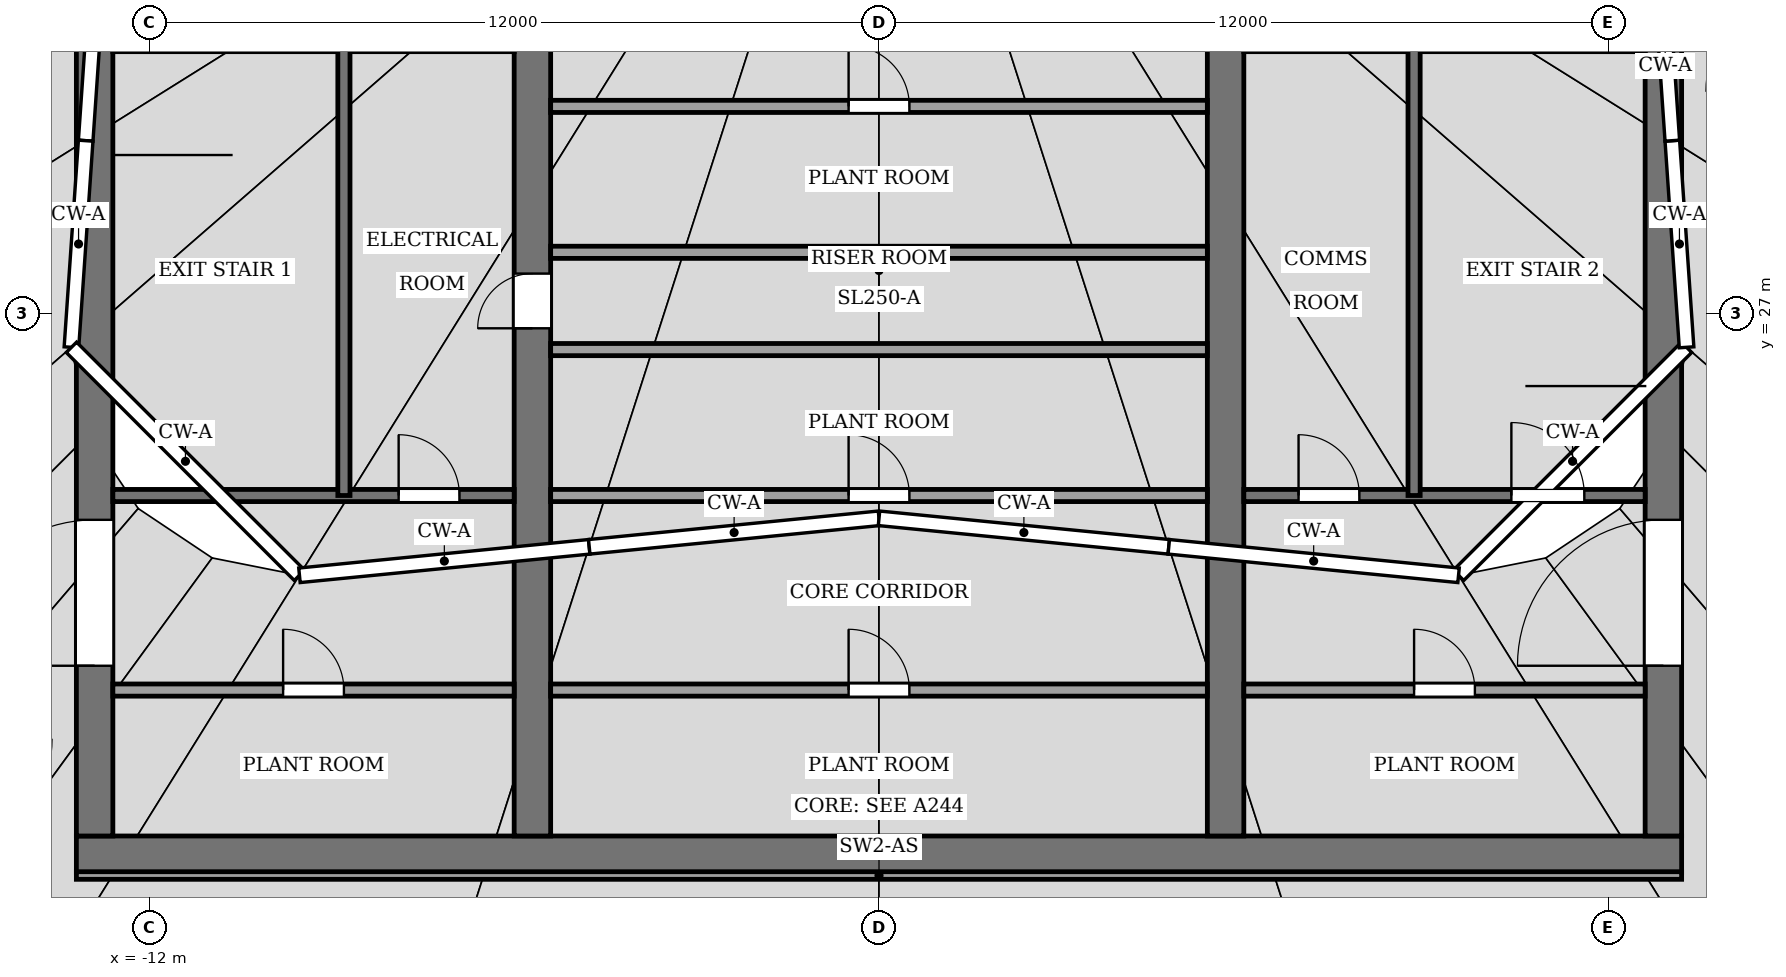
"""IFC4 building model, lengths in metres.
Left out: names, types, materials, properties, quantities, classifications, styles, units other than length and angle.
Written with IfcOpenShell. Run it as: python <this file> out.ifc"""

import sys

from ifc_helpers import new_model, si_unit, direction, frame, frame_2d, origin, place, context, subcontext, project, spatial, rectangle, extrude, element, fill, save


model = new_model("IFC4")
c1 = context("Model", 3, precision=1e-05, world=origin(), true_north=direction((0.0, 1.0)))
c2 = subcontext(c1, "Body", "Model", "MODEL_VIEW")
j1 = project(units=[si_unit("LENGTHUNIT", "METRE"), si_unit("PLANEANGLEUNIT", "RADIAN")], contexts=[c1])
p1 = place(None, origin())
s1 = spatial("IfcSite", under=j1, at=p1, CompositionType="ELEMENT")
p2 = place(p1, origin())
s2 = spatial("IfcBuilding", under=s1, at=p2, CompositionType="ELEMENT")
p3 = place(p2, frame((0.0, 0.0, 368.0)))
s3 = spatial("IfcBuildingStorey", under=s2, at=p3, CompositionType="ELEMENT", Elevation=368.0)
p4 = place(p3, frame((-13.2, 18.1, -0.15), z_axis=(0.0, 0.0, 1.0), x_axis=(1.0, 0.0, 0.0)))
e1 = element("IfcWall", 1, at=p4, inside=s3, PredefinedType="SHEAR", context=c2, shape_type="SweptSolid", body=[
    extrude(rectangle(XDim=26.4, YDim=0.6, at=frame_2d((13.2, 0.0))), origin(), (0.0, 0.0, 1.0), 3.45),
])
p5 = place(p3, frame((-12.9, 18.4, -0.15), z_axis=(0.0, 0.0, 1.0), x_axis=(0.0, 1.0, 0.0)))
e2 = element("IfcWall", 2, at=p5, inside=s3, PredefinedType="SHEAR", context=c2, shape_type="SweptSolid", body=[
    extrude(rectangle(XDim=19.2, YDim=0.6, at=frame_2d((9.6, 0.0))), origin(), (0.0, 0.0, 1.0), 3.45),
])
p6 = place(p5, frame((2.8, 0.0, 0.15)))
e3 = element("IfcOpeningElement", 3, at=p6, cuts=e2, PredefinedType="OPENING", context=c2, shape_type="SweptSolid", body=[
    extrude(rectangle(XDim=2.4, YDim=2.4, at=frame_2d((1.2, 1.2))), frame((0.0, 0.31, 0.0), z_axis=(0.0, -1.0, 0.0), x_axis=(1.0, 0.0, 0.0)), (0.0, 0.0, 1.0), 0.62),
])
p7 = place(p5, frame((13.4, 0.0, 0.15)))
e4 = element("IfcOpeningElement", 4, at=p7, cuts=e2, PredefinedType="OPENING", context=c2, shape_type="SweptSolid", body=[
    extrude(rectangle(XDim=1.4, YDim=2.2, at=frame_2d((0.7, 1.1))), frame((0.0, 0.31, 0.0), z_axis=(0.0, -1.0, 0.0), x_axis=(1.0, 0.0, 0.0)), (0.0, 0.0, 1.0), 0.62),
])
p8 = place(p3, frame((12.9, 18.4, -0.15), z_axis=(0.0, 0.0, 1.0), x_axis=(0.0, 1.0, 0.0)))
e5 = element("IfcWall", 5, at=p8, inside=s3, PredefinedType="SHEAR", context=c2, shape_type="SweptSolid", body=[
    extrude(rectangle(XDim=19.2, YDim=0.6, at=frame_2d((9.6, 0.0))), origin(), (0.0, 0.0, 1.0), 3.45),
])
p9 = place(p8, frame((2.8, 0.0, 0.15)))
e6 = element("IfcOpeningElement", 6, at=p9, cuts=e5, PredefinedType="OPENING", context=c2, shape_type="SweptSolid", body=[
    extrude(rectangle(XDim=2.4, YDim=2.4, at=frame_2d((1.2, 1.2))), frame((0.0, 0.31, 0.0), z_axis=(0.0, -1.0, 0.0), x_axis=(1.0, 0.0, 0.0)), (0.0, 0.0, 1.0), 0.62),
])
p10 = place(p8, frame((13.3, 0.0, 0.15)))
e7 = element("IfcOpeningElement", 7, at=p10, cuts=e5, PredefinedType="OPENING", context=c2, shape_type="SweptSolid", body=[
    extrude(rectangle(XDim=2.4, YDim=2.4, at=frame_2d((1.2, 1.2))), frame((0.0, 0.31, 0.0), z_axis=(0.0, -1.0, 0.0), x_axis=(1.0, 0.0, 0.0)), (0.0, 0.0, 1.0), 0.62),
])
p11 = place(p3, frame((-5.7, 18.4, -0.15), z_axis=(0.0, 0.0, 1.0), x_axis=(0.0, 1.0, 0.0)))
e8 = element("IfcWall", 8, at=p11, inside=s3, PredefinedType="SHEAR", context=c2, shape_type="SweptSolid", body=[
    extrude(rectangle(XDim=19.2, YDim=0.6, at=frame_2d((9.6, 0.0))), origin(), (0.0, 0.0, 1.0), 3.45),
])
p12 = place(p11, frame((8.35, 0.0, 0.15)))
e9 = element("IfcOpeningElement", 9, at=p12, cuts=e8, PredefinedType="OPENING", context=c2, shape_type="SweptSolid", body=[
    extrude(rectangle(XDim=0.9, YDim=2.1, at=frame_2d((0.45, 1.05))), frame((0.0, 0.31, 0.0), z_axis=(0.0, -1.0, 0.0), x_axis=(1.0, 0.0, 0.0)), (0.0, 0.0, 1.0), 0.62),
])
p13 = place(p3, frame((5.7, 18.4, -0.15), z_axis=(0.0, 0.0, 1.0), x_axis=(0.0, 1.0, 0.0)))
e10 = element("IfcWall", 10, at=p13, inside=s3, PredefinedType="SHEAR", context=c2, shape_type="SweptSolid", body=[
    extrude(rectangle(XDim=19.2, YDim=0.6, at=frame_2d((9.6, 0.0))), origin(), (0.0, 0.0, 1.0), 3.45),
])
p14 = place(p13, frame((13.3, 0.0, 0.15)))
e11 = element("IfcOpeningElement", 11, at=p14, cuts=e10, PredefinedType="OPENING", context=c2, shape_type="SweptSolid", body=[
    extrude(rectangle(XDim=2.4, YDim=2.4, at=frame_2d((1.2, 1.2))), frame((0.0, 0.31, 0.0), z_axis=(0.0, -1.0, 0.0), x_axis=(1.0, 0.0, 0.0)), (0.0, 0.0, 1.0), 0.62),
])
p15 = place(p3, frame((-12.6, 20.8, 0.0), z_axis=(0.0, 0.0, 1.0), x_axis=(1.0, 0.0, 0.0)))
e12 = element("IfcWall", 12, at=p15, inside=s3, PredefinedType="PARTITIONING", context=c2, shape_type="SweptSolid", body=[
    extrude(rectangle(XDim=6.6, YDim=0.2, at=frame_2d((3.3, 0.0))), origin(), (0.0, 0.0, 1.0), 3.3),
])
p16 = place(p15, frame((2.8, 0.0, 0.0)))
e13 = element("IfcOpeningElement", 13, at=p16, cuts=e12, PredefinedType="OPENING", context=c2, shape_type="SweptSolid", body=[
    extrude(rectangle(XDim=1.0, YDim=2.1, at=frame_2d((0.5, 1.05))), frame((0.0, 0.11, 0.0), z_axis=(0.0, -1.0, 0.0), x_axis=(1.0, 0.0, 0.0)), (0.0, 0.0, 1.0), 0.22),
])
p17 = place(p3, frame((-5.4, 20.8, 0.0), z_axis=(0.0, 0.0, 1.0), x_axis=(1.0, 0.0, 0.0)))
e14 = element("IfcWall", 14, at=p17, inside=s3, PredefinedType="PARTITIONING", context=c2, shape_type="SweptSolid", body=[
    extrude(rectangle(XDim=10.8, YDim=0.2, at=frame_2d((5.4, 0.0))), origin(), (0.0, 0.0, 1.0), 3.3),
])
p18 = place(p17, frame((4.9, 0.0, 0.0)))
e15 = element("IfcOpeningElement", 15, at=p18, cuts=e14, PredefinedType="OPENING", context=c2, shape_type="SweptSolid", body=[
    extrude(rectangle(XDim=1.0, YDim=2.1, at=frame_2d((0.5, 1.05))), frame((0.0, 0.11, 0.0), z_axis=(0.0, -1.0, 0.0), x_axis=(1.0, 0.0, 0.0)), (0.0, 0.0, 1.0), 0.22),
])
p19 = place(p3, frame((6.0, 20.8, 0.0), z_axis=(0.0, 0.0, 1.0), x_axis=(1.0, 0.0, 0.0)))
e16 = element("IfcWall", 16, at=p19, inside=s3, PredefinedType="PARTITIONING", context=c2, shape_type="SweptSolid", body=[
    extrude(rectangle(XDim=6.6, YDim=0.2, at=frame_2d((3.3, 0.0))), origin(), (0.0, 0.0, 1.0), 3.3),
])
p20 = place(p19, frame((2.8, 0.0, 0.0)))
e17 = element("IfcOpeningElement", 17, at=p20, cuts=e16, PredefinedType="OPENING", context=c2, shape_type="SweptSolid", body=[
    extrude(rectangle(XDim=1.0, YDim=2.1, at=frame_2d((0.5, 1.05))), frame((0.0, 0.11, 0.0), z_axis=(0.0, -1.0, 0.0), x_axis=(1.0, 0.0, 0.0)), (0.0, 0.0, 1.0), 0.22),
])
p21 = place(p3, frame((-12.6, 24.0, 0.0), z_axis=(0.0, 0.0, 1.0), x_axis=(1.0, 0.0, 0.0)))
e18 = element("IfcWall", 18, at=p21, inside=s3, PredefinedType="PARTITIONING", context=c2, shape_type="SweptSolid", body=[
    extrude(rectangle(XDim=6.6, YDim=0.2, at=frame_2d((3.3, 0.0))), origin(), (0.0, 0.0, 1.0), 3.3),
])
p22 = place(p21, frame((4.7, 0.0, 0.0)))
e19 = element("IfcOpeningElement", 19, at=p22, cuts=e18, PredefinedType="OPENING", context=c2, shape_type="SweptSolid", body=[
    extrude(rectangle(XDim=1.0, YDim=2.1, at=frame_2d((0.5, 1.05))), frame((0.0, 0.11, 0.0), z_axis=(0.0, -1.0, 0.0), x_axis=(1.0, 0.0, 0.0)), (0.0, 0.0, 1.0), 0.22),
])
p23 = place(p3, frame((-5.4, 24.0, 0.0), z_axis=(0.0, 0.0, 1.0), x_axis=(1.0, 0.0, 0.0)))
e20 = element("IfcWall", 20, at=p23, inside=s3, PredefinedType="PARTITIONING", context=c2, shape_type="SweptSolid", body=[
    extrude(rectangle(XDim=10.8, YDim=0.2, at=frame_2d((5.4, 0.0))), origin(), (0.0, 0.0, 1.0), 3.3),
])
p24 = place(p23, frame((4.9, 0.0, 0.0)))
e21 = element("IfcOpeningElement", 21, at=p24, cuts=e20, PredefinedType="OPENING", context=c2, shape_type="SweptSolid", body=[
    extrude(rectangle(XDim=1.0, YDim=2.1, at=frame_2d((0.5, 1.05))), frame((0.0, 0.11, 0.0), z_axis=(0.0, -1.0, 0.0), x_axis=(1.0, 0.0, 0.0)), (0.0, 0.0, 1.0), 0.22),
])
p25 = place(p3, frame((6.0, 24.0, 0.0), z_axis=(0.0, 0.0, 1.0), x_axis=(1.0, 0.0, 0.0)))
e22 = element("IfcWall", 22, at=p25, inside=s3, PredefinedType="PARTITIONING", context=c2, shape_type="SweptSolid", body=[
    extrude(rectangle(XDim=6.6, YDim=0.2, at=frame_2d((3.3, 0.0))), origin(), (0.0, 0.0, 1.0), 3.3),
])
p26 = place(p25, frame((0.9, 0.0, 0.0)))
e23 = element("IfcOpeningElement", 23, at=p26, cuts=e22, PredefinedType="OPENING", context=c2, shape_type="SweptSolid", body=[
    extrude(rectangle(XDim=1.0, YDim=2.1, at=frame_2d((0.5, 1.05))), frame((0.0, 0.11, 0.0), z_axis=(0.0, -1.0, 0.0), x_axis=(1.0, 0.0, 0.0)), (0.0, 0.0, 1.0), 0.22),
])
p27 = place(p25, frame((4.4, 0.0, 0.0)))
e24 = element("IfcOpeningElement", 24, at=p27, cuts=e22, PredefinedType="OPENING", context=c2, shape_type="SweptSolid", body=[
    extrude(rectangle(XDim=1.2, YDim=2.2, at=frame_2d((0.6, 1.1))), frame((0.0, 0.11, 0.0), z_axis=(0.0, -1.0, 0.0), x_axis=(1.0, 0.0, 0.0)), (0.0, 0.0, 1.0), 0.22),
])
for number, where, z_axis, x_axis in (
    (25, (-5.4, 26.4, 0.0), (0.0, 0.0, 1.0), (1.0, 0.0, 0.0)),
    (26, (-5.4, 28.0, 0.0), (0.0, 0.0, 1.0), (1.0, 0.0, 0.0)),
):
    element("IfcWall", number, at=place(p3, frame(where, z_axis=z_axis, x_axis=x_axis)), inside=s3, PredefinedType="PARTITIONING", context=c2, shape_type="SweptSolid", body=[
        extrude(rectangle(XDim=10.8, YDim=0.2, at=frame_2d((5.4, 0.0))), origin(), (0.0, 0.0, 1.0), 3.3),
    ])
p28 = place(p3, frame((-5.4, 30.4, 0.0), z_axis=(0.0, 0.0, 1.0), x_axis=(1.0, 0.0, 0.0)))
e27 = element("IfcWall", 27, at=p28, inside=s3, PredefinedType="PARTITIONING", context=c2, shape_type="SweptSolid", body=[
    extrude(rectangle(XDim=10.8, YDim=0.2, at=frame_2d((5.4, 0.0))), origin(), (0.0, 0.0, 1.0), 3.3),
])
p29 = place(p28, frame((4.9, 0.0, 0.0)))
e28 = element("IfcOpeningElement", 28, at=p29, cuts=e27, PredefinedType="OPENING", context=c2, shape_type="SweptSolid", body=[
    extrude(rectangle(XDim=1.0, YDim=2.1, at=frame_2d((0.5, 1.05))), frame((0.0, 0.11, 0.0), z_axis=(0.0, -1.0, 0.0), x_axis=(1.0, 0.0, 0.0)), (0.0, 0.0, 1.0), 0.22),
])
p30 = place(p3, frame((-12.6, 31.4, 0.0), z_axis=(0.0, 0.0, 1.0), x_axis=(1.0, 0.0, 0.0)))
e29 = element("IfcWall", 29, at=p30, inside=s3, PredefinedType="PARTITIONING", context=c2, shape_type="SweptSolid", body=[
    extrude(rectangle(XDim=6.6, YDim=0.2, at=frame_2d((3.3, 0.0))), origin(), (0.0, 0.0, 1.0), 3.3),
])
p31 = place(p30, frame((1.0, 0.0, 0.0)))
e30 = element("IfcOpeningElement", 30, at=p31, cuts=e29, PredefinedType="OPENING", context=c2, shape_type="SweptSolid", body=[
    extrude(rectangle(XDim=1.2, YDim=2.2, at=frame_2d((0.6, 1.1))), frame((0.0, 0.11, 0.0), z_axis=(0.0, -1.0, 0.0), x_axis=(1.0, 0.0, 0.0)), (0.0, 0.0, 1.0), 0.22),
])
p32 = place(p3, frame((6.0, 31.4, 0.0), z_axis=(0.0, 0.0, 1.0), x_axis=(1.0, 0.0, 0.0)))
e31 = element("IfcWall", 31, at=p32, inside=s3, PredefinedType="PARTITIONING", context=c2, shape_type="SweptSolid", body=[
    extrude(rectangle(XDim=6.6, YDim=0.2, at=frame_2d((3.3, 0.0))), origin(), (0.0, 0.0, 1.0), 3.3),
])
for number, where, z_axis, x_axis in (
    (32, (-8.8, 24.0, 0.0), (0.0, 0.0, 1.0), (0.0, 1.0, 0.0)),
    (33, (8.8, 24.0, 0.0), (0.0, 0.0, 1.0), (0.0, 1.0, 0.0)),
):
    element("IfcWall", number, at=place(p3, frame(where, z_axis=z_axis, x_axis=x_axis)), inside=s3, PredefinedType="PARTITIONING", context=c2, shape_type="SweptSolid", body=[
        extrude(rectangle(XDim=7.4, YDim=0.2, at=frame_2d((3.7, 0.0))), origin(), (0.0, 0.0, 1.0), 3.3),
    ])
p33 = place(p3, frame((-13.2, 17.75, 0.0), z_axis=(0.0, 0.0, 1.0), x_axis=(1.0, 0.0, 0.0)))
e34 = element("IfcWall", 34, at=p33, inside=s3, PredefinedType="PARTITIONING", context=c2, shape_type="SweptSolid", body=[
    extrude(rectangle(XDim=26.4, YDim=0.125, at=frame_2d((13.2, 0.0))), origin(), (0.0, 0.0, 1.0), 2.97),
])
p34 = place(p18, origin())
e35 = element("IfcDoor", 35, at=p34, inside=s3, OperationType="SINGLE_SWING_LEFT", PredefinedType="DOOR", context=c2, shape_type="SweptSolid", body=[
    extrude(rectangle(XDim=1.0, YDim=2.1, at=frame_2d((0.5, 1.05))), frame((0.0, 0.025, 0.0), z_axis=(0.0, -1.0, 0.0), x_axis=(1.0, 0.0, 0.0)), (0.0, 0.0, 1.0), 0.05),
])
fill(e15, e35)
p35 = place(p24, origin())
e36 = element("IfcDoor", 36, at=p35, inside=s3, OperationType="SINGLE_SWING_RIGHT", PredefinedType="DOOR", context=c2, shape_type="SweptSolid", body=[
    extrude(rectangle(XDim=1.0, YDim=2.1, at=frame_2d((0.5, 1.05))), frame((0.0, 0.025, 0.0), z_axis=(0.0, -1.0, 0.0), x_axis=(1.0, 0.0, 0.0)), (0.0, 0.0, 1.0), 0.05),
])
fill(e21, e36)
p36 = place(p29, origin())
e37 = element("IfcDoor", 37, at=p36, inside=s3, OperationType="SINGLE_SWING_LEFT", PredefinedType="DOOR", context=c2, shape_type="SweptSolid", body=[
    extrude(rectangle(XDim=1.0, YDim=2.1, at=frame_2d((0.5, 1.05))), frame((0.0, 0.025, 0.0), z_axis=(0.0, -1.0, 0.0), x_axis=(1.0, 0.0, 0.0)), (0.0, 0.0, 1.0), 0.05),
])
fill(e28, e37)
p37 = place(p16, origin())
e38 = element("IfcDoor", 38, at=p37, inside=s3, OperationType="SINGLE_SWING_RIGHT", PredefinedType="DOOR", context=c2, shape_type="SweptSolid", body=[
    extrude(rectangle(XDim=1.0, YDim=2.1, at=frame_2d((0.5, 1.05))), frame((0.0, 0.025, 0.0), z_axis=(0.0, -1.0, 0.0), x_axis=(1.0, 0.0, 0.0)), (0.0, 0.0, 1.0), 0.05),
])
fill(e13, e38)
p38 = place(p20, origin())
e39 = element("IfcDoor", 39, at=p38, inside=s3, OperationType="SINGLE_SWING_LEFT", PredefinedType="DOOR", context=c2, shape_type="SweptSolid", body=[
    extrude(rectangle(XDim=1.0, YDim=2.1, at=frame_2d((0.5, 1.05))), frame((0.0, 0.025, 0.0), z_axis=(0.0, -1.0, 0.0), x_axis=(1.0, 0.0, 0.0)), (0.0, 0.0, 1.0), 0.05),
])
fill(e17, e39)
p39 = place(p22, origin())
e40 = element("IfcDoor", 40, at=p39, inside=s3, OperationType="SINGLE_SWING_LEFT", PredefinedType="DOOR", context=c2, shape_type="SweptSolid", body=[
    extrude(rectangle(XDim=1.0, YDim=2.1, at=frame_2d((0.5, 1.05))), frame((0.0, 0.025, 0.0), z_axis=(0.0, -1.0, 0.0), x_axis=(1.0, 0.0, 0.0)), (0.0, 0.0, 1.0), 0.05),
])
fill(e19, e40)
p40 = place(p26, origin())
e41 = element("IfcDoor", 41, at=p40, inside=s3, OperationType="SINGLE_SWING_RIGHT", PredefinedType="DOOR", context=c2, shape_type="SweptSolid", body=[
    extrude(rectangle(XDim=1.0, YDim=2.1, at=frame_2d((0.5, 1.05))), frame((0.0, 0.025, 0.0), z_axis=(0.0, -1.0, 0.0), x_axis=(1.0, 0.0, 0.0)), (0.0, 0.0, 1.0), 0.05),
])
fill(e23, e41)
p41 = place(p12, origin())
e42 = element("IfcDoor", 42, at=p41, inside=s3, OperationType="SINGLE_SWING_LEFT", PredefinedType="DOOR", context=c2, shape_type="SweptSolid", body=[
    extrude(rectangle(XDim=0.9, YDim=2.1, at=frame_2d((0.45, 1.05))), frame((0.0, 0.025, 0.0), z_axis=(0.0, -1.0, 0.0), x_axis=(1.0, 0.0, 0.0)), (0.0, 0.0, 1.0), 0.05),
])
fill(e9, e42)
p42 = place(p27, origin())
e43 = element("IfcDoor", 43, at=p42, inside=s3, OperationType="SINGLE_SWING_RIGHT", PredefinedType="DOOR", context=c2, shape_type="SweptSolid", body=[
    extrude(rectangle(XDim=1.2, YDim=2.2, at=frame_2d((0.6, 1.1))), frame((0.0, 0.025, 0.0), z_axis=(0.0, -1.0, 0.0), x_axis=(1.0, 0.0, 0.0)), (0.0, 0.0, 1.0), 0.05),
])
fill(e24, e43)
p43 = place(p6, origin())
e44 = element("IfcDoor", 44, at=p43, inside=s3, OperationType="DOUBLE_DOOR_SINGLE_SWING", PredefinedType="DOOR", context=c2, shape_type="SweptSolid", body=[
    extrude(rectangle(XDim=2.4, YDim=2.4, at=frame_2d((1.2, 1.2))), frame((0.0, 0.025, 0.0), z_axis=(0.0, -1.0, 0.0), x_axis=(1.0, 0.0, 0.0)), (0.0, 0.0, 1.0), 0.05),
])
fill(e3, e44)
p44 = place(p9, origin())
e45 = element("IfcDoor", 45, at=p44, inside=s3, OperationType="DOUBLE_DOOR_SINGLE_SWING", PredefinedType="DOOR", context=c2, shape_type="SweptSolid", body=[
    extrude(rectangle(XDim=2.4, YDim=2.4, at=frame_2d((1.2, 1.2))), frame((0.0, 0.025, 0.0), z_axis=(0.0, -1.0, 0.0), x_axis=(1.0, 0.0, 0.0)), (0.0, 0.0, 1.0), 0.05),
])
fill(e6, e45)
save(model, sys.argv[1])
